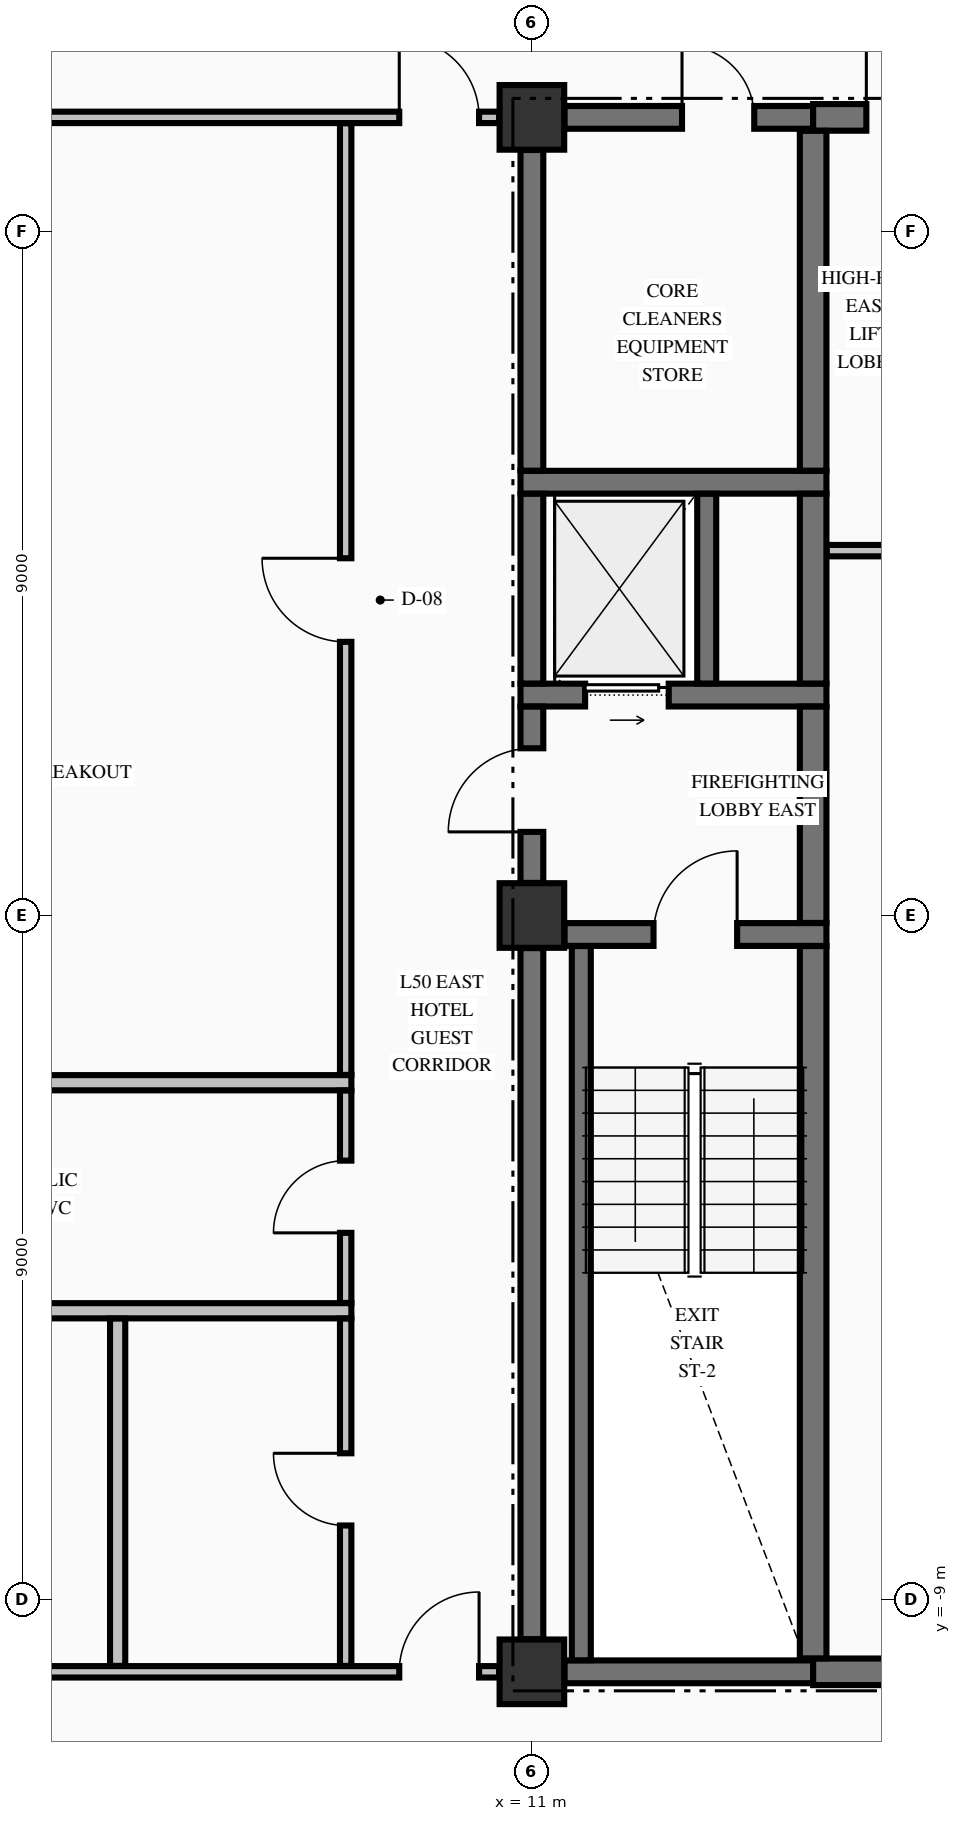
"""IFC4 building model, lengths in metres.
Left out: names, types, materials, properties, quantities, classifications, styles, units other than length and angle.
Written with IfcOpenShell. Run it as: python <this file> out.ifc"""

import sys

from ifc_helpers import new_model, si_unit, direction, frame, frame_2d, origin, origin_2d, place, context, subcontext, project, spatial, rectangle, extrude, element, fill, save


model = new_model("IFC4")
c1 = context("Model", 3, precision=1e-05, world=origin(), true_north=direction((0.0, 1.0)))
c2 = subcontext(c1, "Body", "Model", "MODEL_VIEW")
j1 = project(units=[si_unit("LENGTHUNIT", "METRE"), si_unit("PLANEANGLEUNIT", "RADIAN")], contexts=[c1])
p1 = place(None, origin())
s1 = spatial("IfcSite", under=j1, at=p1, CompositionType="ELEMENT")
p2 = place(p1, origin())
s2 = spatial("IfcBuilding", under=s1, at=p2, CompositionType="ELEMENT")
p3 = place(p2, frame((0.0, 0.0, 194.86)))
s3 = spatial("IfcBuildingStorey", under=s2, at=p3, CompositionType="ELEMENT", Elevation=194.86)
for number, where, z_axis, x_axis in (
    (1, (11.0, -9.95, -0.275), (0.0, 0.0, 1.0), (1.0, 0.0, 0.0)),
    (2, (11.0, 0.0, -0.275), (0.0, 0.0, 1.0), (1.0, 0.0, 0.0)),
    (3, (11.0, 10.5, -0.275), (0.0, 0.0, 1.0), (1.0, 0.0, 0.0)),
):
    element("IfcColumn", number, at=place(p3, frame(where, z_axis=z_axis, x_axis=x_axis)), inside=s3, PredefinedType="COLUMN", context=c2, shape_type="SweptSolid", body=[
        extrude(rectangle(XDim=0.85, YDim=0.85, at=origin_2d()), origin(), (0.0, 0.0, 1.0), 3.425),
    ])
p4 = place(p3, frame((11.429, -9.95, 0.0), z_axis=(0.0, 0.0, 1.0), x_axis=(1.0, 0.0, 0.0)))
e4 = element("IfcWall", 4, at=p4, inside=s3, PredefinedType="SHEAR", context=c2, shape_type="SweptSolid", body=[
    extrude(rectangle(XDim=3.271, YDim=0.3, at=frame_2d((1.635, 0.0))), origin(), (0.0, 0.0, 1.0), 3.15),
])
p5 = place(p3, frame((14.7, -9.95, 0.0), z_axis=(0.0, 0.0, 1.0), x_axis=(1.0, 0.0, 0.0)))
e5 = element("IfcWall", 5, at=p5, inside=s3, PredefinedType="SHEAR", context=c2, shape_type="SweptSolid", body=[
    extrude(rectangle(XDim=4.871, YDim=0.35, at=frame_2d((2.436, 0.0))), origin(), (0.0, 0.0, 1.0), 3.15),
])
p6 = place(p5, frame((2.125, 0.0, 0.0)))
e6 = element("IfcOpeningElement", 6, at=p6, cuts=e5, PredefinedType="OPENING", context=c2, shape_type="SweptSolid", body=[
    extrude(rectangle(XDim=1.05, YDim=2.15, at=frame_2d((0.525, 1.075))), frame((0.0, 0.185, 0.0), z_axis=(0.0, -1.0, 0.0), x_axis=(1.0, 0.0, 0.0)), (0.0, 0.0, 1.0), 0.37),
])
p7 = place(p3, frame((11.429, -0.25, 0.0), z_axis=(0.0, 0.0, 1.0), x_axis=(1.0, 0.0, 0.0)))
e7 = element("IfcWall", 7, at=p7, inside=s3, PredefinedType="SHEAR", context=c2, shape_type="SweptSolid", body=[
    extrude(rectangle(XDim=3.446, YDim=0.3, at=frame_2d((1.723, 0.0))), origin(), (0.0, 0.0, 1.0), 3.15),
])
p8 = place(p7, frame((1.171, 0.0, 0.0)))
e8 = element("IfcOpeningElement", 8, at=p8, cuts=e7, PredefinedType="OPENING", context=c2, shape_type="SweptSolid", body=[
    extrude(rectangle(XDim=1.1, YDim=2.15, at=frame_2d((0.55, 1.075))), frame((0.0, 0.16, 0.0), z_axis=(0.0, -1.0, 0.0), x_axis=(1.0, 0.0, 0.0)), (0.0, 0.0, 1.0), 0.32),
])
p9 = place(p3, frame((10.85, 2.9, 0.0), z_axis=(0.0, 0.0, 1.0), x_axis=(1.0, 0.0, 0.0)))
e9 = element("IfcWall", 9, at=p9, inside=s3, PredefinedType="SHEAR", context=c2, shape_type="SweptSolid", body=[
    extrude(rectangle(XDim=4.025, YDim=0.3, at=frame_2d((2.012, 0.0))), origin(), (0.0, 0.0, 1.0), 3.15),
])
p10 = place(p9, frame((0.85, 0.0, 0.0)))
e10 = element("IfcOpeningElement", 10, at=p10, cuts=e9, PredefinedType="OPENING", context=c2, shape_type="SweptSolid", body=[
    extrude(rectangle(XDim=1.1, YDim=2.2, at=frame_2d((0.55, 1.1))), frame((0.0, 0.16, 0.0), z_axis=(0.0, -1.0, 0.0), x_axis=(1.0, 0.0, 0.0)), (0.0, 0.0, 1.0), 0.32),
])
p11 = place(p3, frame((10.85, 5.7, 0.0), z_axis=(0.0, 0.0, 1.0), x_axis=(1.0, 0.0, 0.0)))
e11 = element("IfcWall", 11, at=p11, inside=s3, PredefinedType="SHEAR", context=c2, shape_type="SweptSolid", body=[
    extrude(rectangle(XDim=4.025, YDim=0.3, at=frame_2d((2.012, 0.0))), origin(), (0.0, 0.0, 1.0), 3.15),
])
p12 = place(p3, frame((11.429, 10.5, 0.0), z_axis=(0.0, 0.0, 1.0), x_axis=(1.0, 0.0, 0.0)))
e12 = element("IfcWall", 12, at=p12, inside=s3, PredefinedType="SHEAR", context=c2, shape_type="SweptSolid", body=[
    extrude(rectangle(XDim=3.271, YDim=0.3, at=frame_2d((1.635, 0.0))), origin(), (0.0, 0.0, 1.0), 3.15),
])
p13 = place(p12, frame((1.546, 0.0, 0.0)))
e13 = element("IfcOpeningElement", 13, at=p13, cuts=e12, PredefinedType="OPENING", context=c2, shape_type="SweptSolid", body=[
    extrude(rectangle(XDim=0.95, YDim=2.15, at=frame_2d((0.475, 1.075))), frame((0.0, 0.16, 0.0), z_axis=(0.0, -1.0, 0.0), x_axis=(1.0, 0.0, 0.0)), (0.0, 0.0, 1.0), 0.32),
])
p14 = place(p3, frame((14.7, 10.5, 0.0), z_axis=(0.0, 0.0, 1.0), x_axis=(1.0, 0.0, 0.0)))
e14 = element("IfcWall", 14, at=p14, inside=s3, PredefinedType="SHEAR", context=c2, shape_type="SweptSolid", body=[
    extrude(rectangle(XDim=4.871, YDim=0.35, at=frame_2d((2.436, 0.0))), origin(), (0.0, 0.0, 1.0), 3.15),
])
p15 = place(p14, frame((0.7, 0.0, 0.0)))
e15 = element("IfcOpeningElement", 15, at=p15, cuts=e14, PredefinedType="OPENING", context=c2, shape_type="SweptSolid", body=[
    extrude(rectangle(XDim=1.1, YDim=2.15, at=frame_2d((0.55, 1.075))), frame((0.0, 0.185, 0.0), z_axis=(0.0, -1.0, 0.0), x_axis=(1.0, 0.0, 0.0)), (0.0, 0.0, 1.0), 0.37),
])
p16 = place(p3, frame((-10.569, -9.95, 0.0), z_axis=(0.0, 0.0, 1.0), x_axis=(1.0, 0.0, 0.0)))
e16 = element("IfcWall", 16, at=p16, inside=s3, PredefinedType="PARTITIONING", context=c2, shape_type="SweptSolid", body=[
    extrude(rectangle(XDim=21.138, YDim=0.15, at=frame_2d((10.569, 0.0))), origin(), (0.0, 0.0, 1.0), 3.15),
])
p17 = place(p16, frame((0.264, 0.0, 0.0)))
e17 = element("IfcOpeningElement", 17, at=p17, cuts=e16, PredefinedType="OPENING", context=c2, shape_type="SweptSolid", body=[
    extrude(rectangle(XDim=1.05, YDim=2.15, at=frame_2d((0.525, 1.075))), frame((0.0, 0.085, 0.0), z_axis=(0.0, -1.0, 0.0), x_axis=(1.0, 0.0, 0.0)), (0.0, 0.0, 1.0), 0.17),
])
p18 = place(p16, frame((19.824, 0.0, 0.0)))
e18 = element("IfcOpeningElement", 18, at=p18, cuts=e16, PredefinedType="OPENING", context=c2, shape_type="SweptSolid", body=[
    extrude(rectangle(XDim=1.05, YDim=2.15, at=frame_2d((0.525, 1.075))), frame((0.0, 0.085, 0.0), z_axis=(0.0, -1.0, 0.0), x_axis=(1.0, 0.0, 0.0)), (0.0, 0.0, 1.0), 0.17),
])
p19 = place(p16, frame((12.874, 0.0, 0.0)))
e19 = element("IfcOpeningElement", 19, at=p19, cuts=e16, PredefinedType="OPENING", context=c2, shape_type="SweptSolid", body=[
    extrude(rectangle(XDim=0.95, YDim=2.15, at=frame_2d((0.475, 1.075))), frame((0.0, 0.085, 0.0), z_axis=(0.0, -1.0, 0.0), x_axis=(1.0, 0.0, 0.0)), (0.0, 0.0, 1.0), 0.17),
])
for number, where, z_axis, x_axis in (
    (20, (-0.1, -5.2, 0.0), (0.0, 0.0, 1.0), (1.0, 0.0, 0.0)),
    (21, (-0.1, -2.2, 0.0), (0.0, 0.0, 1.0), (1.0, 0.0, 0.0)),
):
    element("IfcWall", number, at=place(p3, frame(where, z_axis=z_axis, x_axis=x_axis)), inside=s3, PredefinedType="PARTITIONING", context=c2, shape_type="SweptSolid", body=[
        extrude(rectangle(XDim=8.725, YDim=0.2, at=frame_2d((4.363, 0.0))), origin(), (0.0, 0.0, 1.0), 3.15),
    ])
p20 = place(p3, frame((14.878, 4.8, 0.0), z_axis=(0.0, 0.0, 1.0), x_axis=(1.0, 0.0, 0.0)))
e22 = element("IfcWall", 22, at=p20, inside=s3, PredefinedType="PARTITIONING", context=c2, shape_type="SweptSolid", body=[
    extrude(rectangle(XDim=4.944, YDim=0.15, at=frame_2d((2.472, 0.0))), origin(), (0.0, 0.0, 1.0), 3.15),
])
p21 = place(p3, frame((-10.569, 10.5, 0.0), z_axis=(0.0, 0.0, 1.0), x_axis=(1.0, 0.0, 0.0)))
e23 = element("IfcWall", 23, at=p21, inside=s3, PredefinedType="PARTITIONING", context=c2, shape_type="SweptSolid", body=[
    extrude(rectangle(XDim=21.138, YDim=0.15, at=frame_2d((10.569, 0.0))), origin(), (0.0, 0.0, 1.0), 3.15),
])
p22 = place(p21, frame((0.264, 0.0, 0.0)))
e24 = element("IfcOpeningElement", 24, at=p22, cuts=e23, PredefinedType="OPENING", context=c2, shape_type="SweptSolid", body=[
    extrude(rectangle(XDim=1.05, YDim=2.15, at=frame_2d((0.525, 1.075))), frame((0.0, 0.085, 0.0), z_axis=(0.0, -1.0, 0.0), x_axis=(1.0, 0.0, 0.0)), (0.0, 0.0, 1.0), 0.17),
])
p23 = place(p21, frame((19.824, 0.0, 0.0)))
e25 = element("IfcOpeningElement", 25, at=p23, cuts=e23, PredefinedType="OPENING", context=c2, shape_type="SweptSolid", body=[
    extrude(rectangle(XDim=1.05, YDim=2.15, at=frame_2d((0.525, 1.075))), frame((0.0, 0.085, 0.0), z_axis=(0.0, -1.0, 0.0), x_axis=(1.0, 0.0, 0.0)), (0.0, 0.0, 1.0), 0.17),
])
p24 = place(p3, frame((11.0, -9.521, 0.0), z_axis=(0.0, 0.0, 1.0), x_axis=(0.0, 1.0, 0.0)))
e26 = element("IfcWall", 26, at=p24, inside=s3, PredefinedType="SHEAR", context=c2, shape_type="SweptSolid", body=[
    extrude(rectangle(XDim=9.092, YDim=0.3, at=frame_2d((4.546, 0.0))), origin(), (0.0, 0.0, 1.0), 3.15),
])
p25 = place(p3, frame((11.0, 0.429, 0.0), z_axis=(0.0, 0.0, 1.0), x_axis=(0.0, 1.0, 0.0)))
e27 = element("IfcWall", 27, at=p25, inside=s3, PredefinedType="SHEAR", context=c2, shape_type="SweptSolid", body=[
    extrude(rectangle(XDim=2.319, YDim=0.3, at=frame_2d((1.16, 0.0))), origin(), (0.0, 0.0, 1.0), 3.15),
])
p26 = place(p25, frame((0.671, 0.0, 0.0)))
e28 = element("IfcOpeningElement", 28, at=p26, cuts=e27, PredefinedType="OPENING", context=c2, shape_type="SweptSolid", body=[
    extrude(rectangle(XDim=1.1, YDim=2.15, at=frame_2d((0.55, 1.075))), frame((0.0, 0.16, 0.0), z_axis=(0.0, -1.0, 0.0), x_axis=(1.0, 0.0, 0.0)), (0.0, 0.0, 1.0), 0.32),
])
p27 = place(p3, frame((11.0, 3.052, 0.0), z_axis=(0.0, 0.0, 1.0), x_axis=(0.0, 1.0, 0.0)))
e29 = element("IfcWall", 29, at=p27, inside=s3, PredefinedType="SHEAR", context=c2, shape_type="SweptSolid", body=[
    extrude(rectangle(XDim=2.496, YDim=0.3, at=frame_2d((1.248, 0.0))), origin(), (0.0, 0.0, 1.0), 3.15),
])
p28 = place(p3, frame((11.0, 5.852, 0.0), z_axis=(0.0, 0.0, 1.0), x_axis=(0.0, 1.0, 0.0)))
e30 = element("IfcWall", 30, at=p28, inside=s3, PredefinedType="SHEAR", context=c2, shape_type="SweptSolid", body=[
    extrude(rectangle(XDim=4.219, YDim=0.3, at=frame_2d((2.109, 0.0))), origin(), (0.0, 0.0, 1.0), 3.15),
])
p29 = place(p3, frame((11.65, -9.798, 0.0), z_axis=(0.0, 0.0, 1.0), x_axis=(0.0, 1.0, 0.0)))
e31 = element("IfcWall", 31, at=p29, inside=s3, PredefinedType="SOLIDWALL", context=c2, shape_type="SweptSolid", body=[
    extrude(rectangle(XDim=9.396, YDim=0.25, at=frame_2d((4.698, 0.0))), origin(), (0.0, 0.0, 1.0), 3.15),
])
p30 = place(p3, frame((13.3, 3.052, 0.0), z_axis=(0.0, 0.0, 1.0), x_axis=(0.0, 1.0, 0.0)))
e32 = element("IfcWall", 32, at=p30, inside=s3, PredefinedType="SOLIDWALL", context=c2, shape_type="SweptSolid", body=[
    extrude(rectangle(XDim=2.496, YDim=0.25, at=frame_2d((1.248, 0.0))), origin(), (0.0, 0.0, 1.0), 3.15),
])
p31 = place(p3, frame((14.7, -9.773, 0.0), z_axis=(0.0, 0.0, 1.0), x_axis=(0.0, 1.0, 0.0)))
e33 = element("IfcWall", 33, at=p31, inside=s3, PredefinedType="SHEAR", context=c2, shape_type="SweptSolid", body=[
    extrude(rectangle(XDim=9.371, YDim=0.35, at=frame_2d((4.686, 0.0))), origin(), (0.0, 0.0, 1.0), 3.15),
])
p32 = place(p3, frame((14.7, -0.098, 0.0), z_axis=(0.0, 0.0, 1.0), x_axis=(0.0, 1.0, 0.0)))
e34 = element("IfcWall", 34, at=p32, inside=s3, PredefinedType="SHEAR", context=c2, shape_type="SweptSolid", body=[
    extrude(rectangle(XDim=2.846, YDim=0.35, at=frame_2d((1.423, 0.0))), origin(), (0.0, 0.0, 1.0), 3.15),
])
p33 = place(p3, frame((14.7, 3.052, 0.0), z_axis=(0.0, 0.0, 1.0), x_axis=(0.0, 1.0, 0.0)))
e35 = element("IfcWall", 35, at=p33, inside=s3, PredefinedType="SHEAR", context=c2, shape_type="SweptSolid", body=[
    extrude(rectangle(XDim=2.496, YDim=0.35, at=frame_2d((1.248, 0.0))), origin(), (0.0, 0.0, 1.0), 3.15),
])
p34 = place(p3, frame((14.7, 5.852, 0.0), z_axis=(0.0, 0.0, 1.0), x_axis=(0.0, 1.0, 0.0)))
e36 = element("IfcWall", 36, at=p34, inside=s3, PredefinedType="SHEAR", context=c2, shape_type="SweptSolid", body=[
    extrude(rectangle(XDim=4.471, YDim=0.35, at=frame_2d((2.235, 0.0))), origin(), (0.0, 0.0, 1.0), 3.15),
])
p35 = place(p3, frame((5.55, -9.872, 0.0), z_axis=(0.0, 0.0, 1.0), x_axis=(0.0, 1.0, 0.0)))
e37 = element("IfcWall", 37, at=p35, inside=s3, PredefinedType="PARTITIONING", context=c2, shape_type="SweptSolid", body=[
    extrude(rectangle(XDim=4.569, YDim=0.2, at=frame_2d((2.285, 0.0))), origin(), (0.0, 0.0, 1.0), 3.15),
])
p36 = place(p3, frame((8.55, -9.872, 0.0), z_axis=(0.0, 0.0, 1.0), x_axis=(0.0, 1.0, 0.0)))
e38 = element("IfcWall", 38, at=p36, inside=s3, PredefinedType="PARTITIONING", context=c2, shape_type="SweptSolid", body=[
    extrude(rectangle(XDim=4.569, YDim=0.15, at=frame_2d((2.285, 0.0))), origin(), (0.0, 0.0, 1.0), 3.15),
])
p37 = place(p36, frame((1.847, 0.0, 0.0)))
e39 = element("IfcOpeningElement", 39, at=p37, cuts=e38, PredefinedType="OPENING", context=c2, shape_type="SweptSolid", body=[
    extrude(rectangle(XDim=0.95, YDim=2.15, at=frame_2d((0.475, 1.075))), frame((0.0, 0.085, 0.0), z_axis=(0.0, -1.0, 0.0), x_axis=(1.0, 0.0, 0.0)), (0.0, 0.0, 1.0), 0.17),
])
p38 = place(p3, frame((8.55, -5.097, 0.0), z_axis=(0.0, 0.0, 1.0), x_axis=(0.0, 1.0, 0.0)))
e40 = element("IfcWall", 40, at=p38, inside=s3, PredefinedType="PARTITIONING", context=c2, shape_type="SweptSolid", body=[
    extrude(rectangle(XDim=2.794, YDim=0.15, at=frame_2d((1.397, 0.0))), origin(), (0.0, 0.0, 1.0), 3.15),
])
p39 = place(p38, frame((0.922, 0.0, 0.0)))
e41 = element("IfcOpeningElement", 41, at=p39, cuts=e40, PredefinedType="OPENING", context=c2, shape_type="SweptSolid", body=[
    extrude(rectangle(XDim=0.95, YDim=2.15, at=frame_2d((0.475, 1.075))), frame((0.0, 0.085, 0.0), z_axis=(0.0, -1.0, 0.0), x_axis=(1.0, 0.0, 0.0)), (0.0, 0.0, 1.0), 0.17),
])
p40 = place(p3, frame((8.55, -2.097, 0.0), z_axis=(0.0, 0.0, 1.0), x_axis=(0.0, 1.0, 0.0)))
e42 = element("IfcWall", 42, at=p40, inside=s3, PredefinedType="PARTITIONING", context=c2, shape_type="SweptSolid", body=[
    extrude(rectangle(XDim=12.519, YDim=0.15, at=frame_2d((6.26, 0.0))), origin(), (0.0, 0.0, 1.0), 3.15),
])
p41 = place(p40, frame((5.697, 0.0, 0.0)))
e43 = element("IfcOpeningElement", 43, at=p41, cuts=e42, PredefinedType="OPENING", context=c2, shape_type="SweptSolid", body=[
    extrude(rectangle(XDim=1.1, YDim=2.15, at=frame_2d((0.55, 1.075))), frame((0.0, 0.085, 0.0), z_axis=(0.0, -1.0, 0.0), x_axis=(1.0, 0.0, 0.0)), (0.0, 0.0, 1.0), 0.17),
])
p42 = place(p8, origin())
e44 = element("IfcDoor", 44, at=p42, inside=s3, OperationType="SINGLE_SWING_RIGHT", PredefinedType="DOOR", context=c2, shape_type="SweptSolid", body=[
    extrude(rectangle(XDim=1.1, YDim=2.15, at=frame_2d((0.55, 1.075))), frame((0.0, 0.025, 0.0), z_axis=(0.0, -1.0, 0.0), x_axis=(1.0, 0.0, 0.0)), (0.0, 0.0, 1.0), 0.05),
])
fill(e8, e44)
p43 = place(p26, origin())
e45 = element("IfcDoor", 45, at=p43, inside=s3, OperationType="SINGLE_SWING_LEFT", PredefinedType="DOOR", context=c2, shape_type="SweptSolid", body=[
    extrude(rectangle(XDim=1.1, YDim=2.15, at=frame_2d((0.55, 1.075))), frame((0.0, 0.025, 0.0), z_axis=(0.0, -1.0, 0.0), x_axis=(1.0, 0.0, 0.0)), (0.0, 0.0, 1.0), 0.05),
])
fill(e28, e45)
p44 = place(p10, origin())
e46 = element("IfcDoor", 46, at=p44, inside=s3, OperationType="SLIDING_TO_RIGHT", PredefinedType="DOOR", context=c2, shape_type="SweptSolid", body=[
    extrude(rectangle(XDim=1.1, YDim=2.2, at=frame_2d((0.55, 1.1))), frame((0.0, 0.025, 0.0), z_axis=(0.0, -1.0, 0.0), x_axis=(1.0, 0.0, 0.0)), (0.0, 0.0, 1.0), 0.05),
])
fill(e10, e46)
p45 = place(p13, origin())
e47 = element("IfcDoor", 47, at=p45, inside=s3, OperationType="SINGLE_SWING_LEFT", PredefinedType="DOOR", context=c2, shape_type="SweptSolid", body=[
    extrude(rectangle(XDim=0.95, YDim=2.15, at=frame_2d((0.475, 1.075))), frame((0.0, 0.025, 0.0), z_axis=(0.0, -1.0, 0.0), x_axis=(1.0, 0.0, 0.0)), (0.0, 0.0, 1.0), 0.05),
])
fill(e13, e47)
p46 = place(p15, origin())
e48 = element("IfcDoor", 48, at=p46, inside=s3, OperationType="SINGLE_SWING_LEFT", PredefinedType="DOOR", context=c2, shape_type="SweptSolid", body=[
    extrude(rectangle(XDim=1.1, YDim=2.15, at=frame_2d((0.55, 1.075))), frame((0.0, 0.025, 0.0), z_axis=(0.0, -1.0, 0.0), x_axis=(1.0, 0.0, 0.0)), (0.0, 0.0, 1.0), 0.05),
])
fill(e15, e48)
p47 = place(p23, origin())
e49 = element("IfcDoor", 49, at=p47, inside=s3, OperationType="SINGLE_SWING_LEFT", PredefinedType="DOOR", context=c2, shape_type="SweptSolid", body=[
    extrude(rectangle(XDim=1.05, YDim=2.15, at=frame_2d((0.525, 1.075))), frame((0.0, 0.025, 0.0), z_axis=(0.0, -1.0, 0.0), x_axis=(1.0, 0.0, 0.0)), (0.0, 0.0, 1.0), 0.05),
])
fill(e25, e49)
p48 = place(p18, origin())
e50 = element("IfcDoor", 50, at=p48, inside=s3, OperationType="SINGLE_SWING_RIGHT", PredefinedType="DOOR", context=c2, shape_type="SweptSolid", body=[
    extrude(rectangle(XDim=1.05, YDim=2.15, at=frame_2d((0.525, 1.075))), frame((0.0, 0.025, 0.0), z_axis=(0.0, -1.0, 0.0), x_axis=(1.0, 0.0, 0.0)), (0.0, 0.0, 1.0), 0.05),
])
fill(e18, e50)
p49 = place(p41, origin())
e51 = element("IfcDoor", 51, at=p49, inside=s3, OperationType="SINGLE_SWING_RIGHT", PredefinedType="DOOR", context=c2, shape_type="SweptSolid", body=[
    extrude(rectangle(XDim=1.1, YDim=2.15, at=frame_2d((0.55, 1.075))), frame((0.0, 0.025, 0.0), z_axis=(0.0, -1.0, 0.0), x_axis=(1.0, 0.0, 0.0)), (0.0, 0.0, 1.0), 0.05),
])
fill(e43, e51)
p50 = place(p39, origin())
e52 = element("IfcDoor", 52, at=p50, inside=s3, OperationType="SINGLE_SWING_LEFT", PredefinedType="DOOR", context=c2, shape_type="SweptSolid", body=[
    extrude(rectangle(XDim=0.95, YDim=2.15, at=frame_2d((0.475, 1.075))), frame((0.0, 0.025, 0.0), z_axis=(0.0, -1.0, 0.0), x_axis=(1.0, 0.0, 0.0)), (0.0, 0.0, 1.0), 0.05),
])
fill(e41, e52)
p51 = place(p37, origin())
e53 = element("IfcDoor", 53, at=p51, inside=s3, OperationType="SINGLE_SWING_RIGHT", PredefinedType="DOOR", context=c2, shape_type="SweptSolid", body=[
    extrude(rectangle(XDim=0.95, YDim=2.15, at=frame_2d((0.475, 1.075))), frame((0.0, 0.025, 0.0), z_axis=(0.0, -1.0, 0.0), x_axis=(1.0, 0.0, 0.0)), (0.0, 0.0, 1.0), 0.05),
])
fill(e39, e53)
save(model, sys.argv[1])
